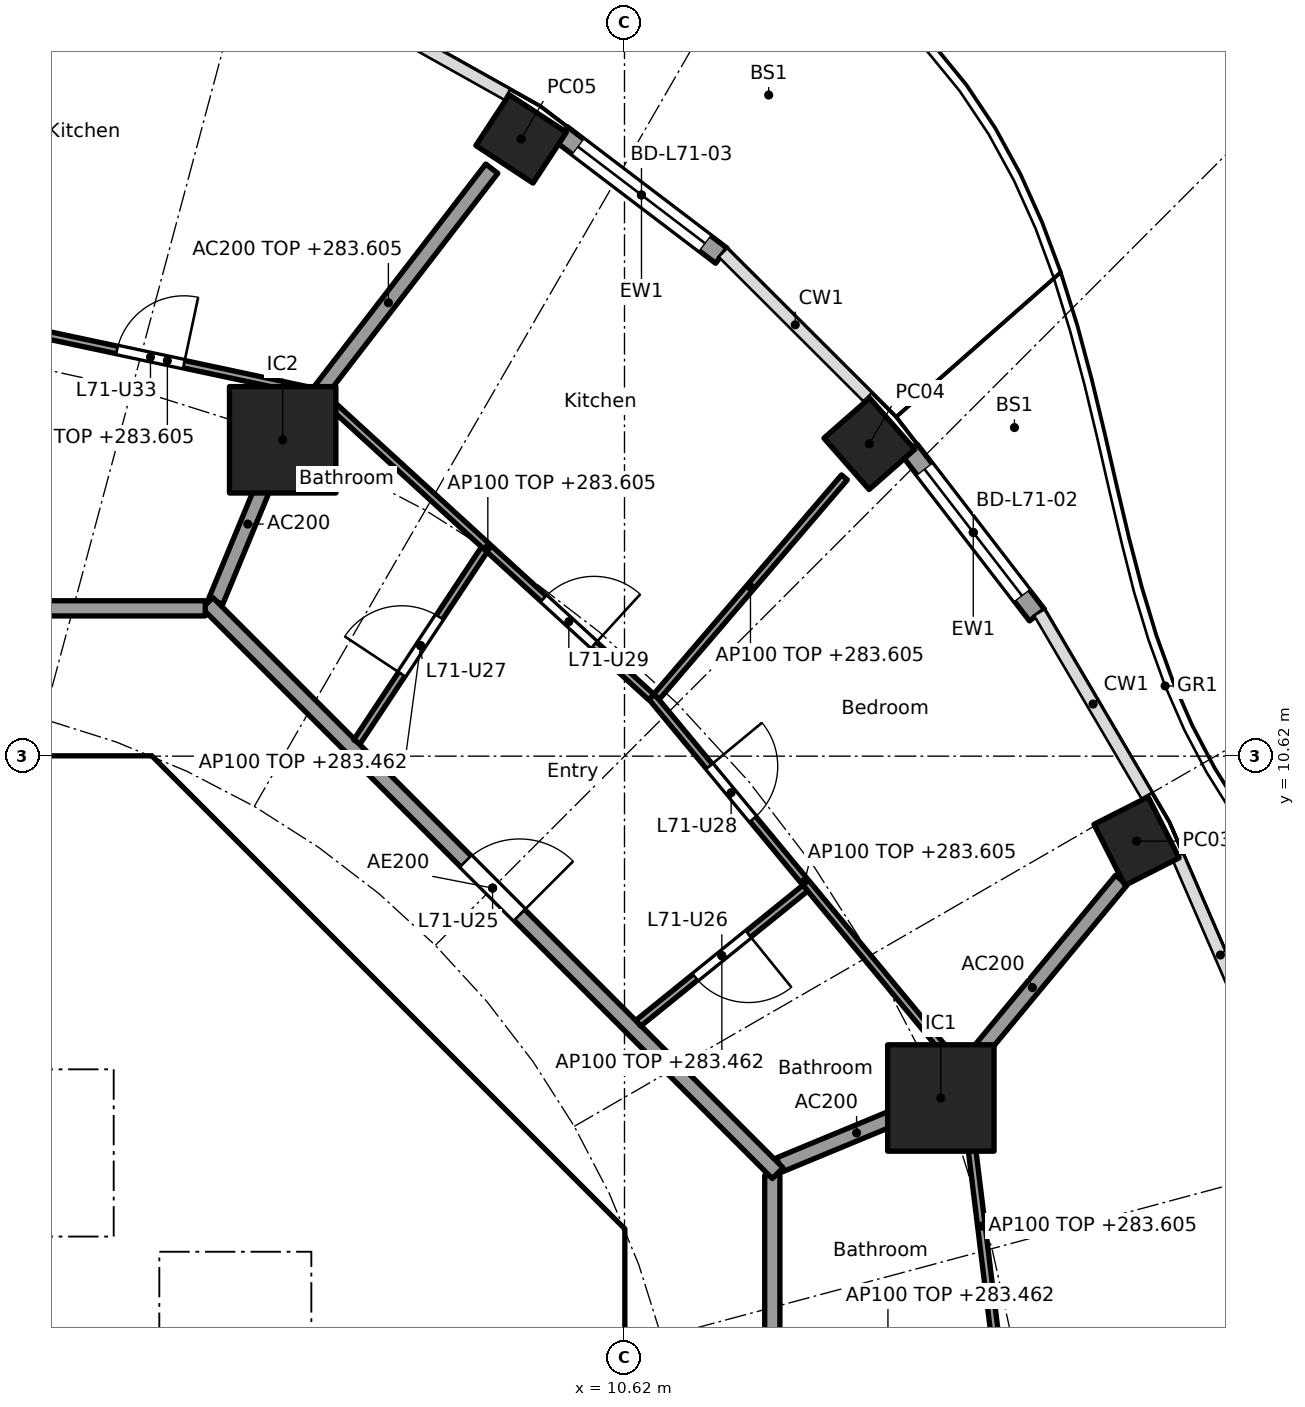
"""IFC4 building model, lengths in metres.
Left out: names, types, materials, properties, quantities, classifications, styles, units other than length and angle.
Written with IfcOpenShell. Run it as: python <this file> out.ifc"""

import sys

from ifc_helpers import new_model, si_unit, direction, frame, frame_2d, origin, origin_2d, place, context, subcontext, project, spatial, polyline, rectangle, hollow_rectangle, outline, extrude, element, fill, save


model = new_model("IFC4")
c1 = context("Model", 3, precision=1e-05, world=origin(), true_north=direction((0.0, 1.0)))
c2 = subcontext(c1, "Body", "Model", "MODEL_VIEW")
j1 = project(units=[si_unit("LENGTHUNIT", "METRE"), si_unit("PLANEANGLEUNIT", "RADIAN")], contexts=[c1])
p1 = place(None, origin())
s1 = spatial("IfcSite", under=j1, at=p1, CompositionType="ELEMENT")
p2 = place(p1, origin())
s2 = spatial("IfcBuilding", under=s1, at=p2, CompositionType="ELEMENT")
p3 = place(p2, frame((0.0, 0.0, 280.7)))
s3 = spatial("IfcBuildingStorey", under=s2, at=p3, CompositionType="ELEMENT", Elevation=280.7)
for number, where, z_axis, x_axis in (
    (1, (17.356, 9.502, 0.0), (0.0, 0.0, 1.0), (-0.452, 0.892, 0.0)),
    (2, (13.841, 14.73, 0.0), (0.0, 0.0, 1.0), (-0.66, 0.751, 0.0)),
    (3, (9.26, 18.741, 0.0), (0.0, 0.0, 1.0), (-0.836, 0.549, 0.0)),
):
    element("IfcColumn", number, at=place(p3, frame(where, z_axis=z_axis, x_axis=x_axis)), inside=s3, PredefinedType="COLUMN", context=c2, shape_type="SweptSolid", body=[
        extrude(hollow_rectangle(XDim=0.9, YDim=0.8, WallThickness=0.028, at=origin_2d()), origin(), (0.0, 0.0, 1.0), 3.7),
    ])
for number, where, z_axis, x_axis in (
    (4, (14.782, 6.123, 0.0), (0.0, 0.0, 1.0), (1.0, 0.0, 0.0)),
    (5, (6.123, 14.782, 0.0), (0.0, 0.0, 1.0), (1.0, 0.0, 0.0)),
):
    element("IfcColumn", number, at=place(p3, frame(where, z_axis=z_axis, x_axis=x_axis)), inside=s3, PredefinedType="COLUMN", context=c2, shape_type="SweptSolid", body=[
        extrude(rectangle(XDim=1.4, YDim=1.4, at=origin_2d()), origin(), (0.0, 0.0, 1.0), 3.7),
    ])
p4 = place(p3, frame((14.37, 14.65, 0.0), z_axis=(0.0, 0.0, 1.0), x_axis=(0.610475325435, -0.79203527512, 0.0)))
e6 = element("IfcWall", 6, at=p4, inside=s3, PredefinedType="SOLIDWALL", context=c2, shape_type="SweptSolid", body=[
    extrude(rectangle(XDim=2.746, YDim=0.25, at=frame_2d((1.373, 0.0))), origin(), (0.0, 0.0, 1.0), 3.44),
])
p5 = place(p4, frame((0.323, 0.0, 0.0)))
e7 = element("IfcOpeningElement", 7, at=p5, cuts=e6, PredefinedType="OPENING", context=c2, shape_type="SweptSolid", body=[
    extrude(rectangle(XDim=2.1, YDim=2.4, at=frame_2d((1.05, 1.2))), frame((0.0, 0.135, 0.0), z_axis=(0.0, -1.0, 0.0), x_axis=(1.0, 0.0, 0.0)), (0.0, 0.0, 1.0), 0.27),
])
p6 = place(p3, frame((9.792, 18.802, 0.0), z_axis=(0.0, 0.0, 1.0), x_axis=(0.796010739377, -0.605282498339, 0.0)))
e8 = element("IfcWall", 8, at=p6, inside=s3, PredefinedType="SOLIDWALL", context=c2, shape_type="SweptSolid", body=[
    extrude(rectangle(XDim=2.641, YDim=0.25, at=frame_2d((1.32, 0.0))), origin(), (0.0, 0.0, 1.0), 3.44),
])
p7 = place(p6, frame((0.27, 0.0, 0.0)))
e9 = element("IfcOpeningElement", 9, at=p7, cuts=e8, PredefinedType="OPENING", context=c2, shape_type="SweptSolid", body=[
    extrude(rectangle(XDim=2.1, YDim=2.4, at=frame_2d((1.05, 1.2))), frame((0.0, 0.135, 0.0), z_axis=(0.0, -1.0, 0.0), x_axis=(1.0, 0.0, 0.0)), (0.0, 0.0, 1.0), 0.27),
])
p8 = place(p3, frame((9.988, 4.613, 0.0), z_axis=(0.0, 0.0, 1.0), x_axis=(-0.707106781187, 0.707106781187, 0.0)))
e10 = element("IfcWall", 10, at=p8, inside=s3, PredefinedType="SHEAR", context=c2, shape_type="SweptSolid", body=[
    extrude(rectangle(XDim=7.602, YDim=0.6, at=frame_2d((3.801, 0.0))), origin(), (0.0, 0.0, 1.0), 3.44),
])
p9 = place(p8, frame((3.201, 0.0, 0.0)))
e11 = element("IfcOpeningElement", 11, at=p9, cuts=e10, PredefinedType="OPENING", context=c2, shape_type="SweptSolid", body=[
    extrude(rectangle(XDim=1.2, YDim=2.1, at=frame_2d((0.6, 1.05))), frame((0.0, 0.31, 0.0), z_axis=(0.0, -1.0, 0.0), x_axis=(1.0, 0.0, 0.0)), (0.0, 0.0, 1.0), 0.62),
])
p10 = place(p3, frame((4.0, 4.3, 0.0), z_axis=(0.0, 0.0, 1.0), x_axis=(0.0, 1.0, 0.0)))
e12 = element("IfcWall", 12, at=p10, inside=s3, PredefinedType="SOLIDWALL", context=c2, shape_type="SweptSolid", body=[
    extrude(rectangle(XDim=2.2, YDim=0.2, at=frame_2d((1.1, 0.0))), origin(), (0.0, 0.0, 1.0), 3.44),
])
p11 = place(p10, frame((0.55, 0.0, 0.0)))
e13 = element("IfcOpeningElement", 13, at=p11, cuts=e12, PredefinedType="OPENING", context=c2, shape_type="SweptSolid", body=[
    extrude(rectangle(XDim=1.1, YDim=2.1, at=frame_2d((0.55, 1.05))), frame((0.0, 0.11, 0.0), z_axis=(0.0, -1.0, 0.0), x_axis=(1.0, 0.0, 0.0)), (0.0, 0.0, 1.0), 0.22),
])
p12 = place(p3, frame((6.7, 4.0, 0.0), z_axis=(0.0, 0.0, 1.0), x_axis=(1.0, 0.0, 0.0)))
e14 = element("IfcWall", 14, at=p12, inside=s3, PredefinedType="SOLIDWALL", context=c2, shape_type="SweptSolid", body=[
    extrude(rectangle(XDim=3.325, YDim=0.2, at=frame_2d((1.662, 0.0))), origin(), (0.0, 0.0, 1.0), 3.44),
])
p13 = place(p12, frame((1.25, 0.0, 0.0)))
e15 = element("IfcOpeningElement", 15, at=p13, cuts=e14, PredefinedType="OPENING", context=c2, shape_type="SweptSolid", body=[
    extrude(rectangle(XDim=1.1, YDim=2.1, at=frame_2d((0.55, 1.05))), frame((0.0, 0.11, 0.0), z_axis=(0.0, -1.0, 0.0), x_axis=(1.0, 0.0, 0.0)), (0.0, 0.0, 1.0), 0.22),
])
p14 = place(p3, frame((4.0, 7.025, 0.0), z_axis=(0.0, 0.0, 1.0), x_axis=(0.0, 1.0, 0.0)))
e16 = element("IfcWall", 16, at=p14, inside=s3, PredefinedType="SOLIDWALL", context=c2, shape_type="SweptSolid", body=[
    extrude(rectangle(XDim=3.0, YDim=0.2, at=frame_2d((1.5, 0.0))), origin(), (0.0, 0.0, 1.0), 3.44),
])
p15 = place(p14, frame((0.925, 0.0, 0.0)))
e17 = element("IfcOpeningElement", 17, at=p15, cuts=e16, PredefinedType="OPENING", context=c2, shape_type="SweptSolid", body=[
    extrude(rectangle(XDim=1.1, YDim=2.1, at=frame_2d((0.55, 1.05))), frame((0.0, 0.11, 0.0), z_axis=(0.0, -1.0, 0.0), x_axis=(1.0, 0.0, 0.0)), (0.0, 0.0, 1.0), 0.22),
])
p16 = place(p3, origin())
e18 = element("IfcWall", 18, at=p16, inside=s3, PredefinedType="SHEAR", context=c2, shape_type="SweptSolid", body=[
    extrude(outline(polyline([(-4.152, 10.025), (-4.401, 9.776), (-4.825, 10.2), (-4.401, 10.625), (4.401, 10.625), (4.825, 10.2), (4.401, 9.776), (4.152, 10.025), (-4.152, 10.025)])), origin(), (0.0, 0.0, 1.0), 3.44),
])
p17 = place(p3, origin())
e19 = element("IfcWall", 19, at=p17, inside=s3, PredefinedType="SHEAR", context=c2, shape_type="SweptSolid", body=[
    extrude(outline(polyline([(9.776, -4.401), (10.025, -4.152), (10.025, -3.801), (10.025, 4.152), (9.776, 4.401), (10.2, 4.825), (10.625, 4.401), (10.625, -4.401), (10.2, -4.825), (9.776, -4.401)])), origin(), (0.0, 0.0, 1.0), 3.44),
])
p18 = place(p3, origin())
e20 = element("IfcWall", 20, at=p18, inside=s3, PredefinedType="SOLIDWALL", context=c2, shape_type="SweptSolid", body=[
    extrude(outline(polyline([(-6.7, 4.3), (6.7, 4.3), (6.7, 2.1), (6.5, 2.1), (6.5, 4.1), (4.5, 4.1), (4.5, 2.1), (4.3, 2.1), (4.3, 4.1), (0.1, 4.1), (0.1, 2.1), (-0.1, 2.1), (-0.1, 4.1), (-2.1, 4.1), (-2.1, 2.1), (-2.3, 2.1), (-2.3, 4.1), (-6.5, 4.1), (-6.5, 2.1), (-6.7, 2.1), (-6.7, 4.3)])), origin(), (0.0, 0.0, 1.0), 3.44),
])
p19 = place(p3, origin())
e21 = element("IfcWall", 21, at=p19, inside=s3, PredefinedType="SOLIDWALL", context=c2, shape_type="SweptSolid", body=[
    extrude(outline(polyline([(4.1, 6.5), (-4.1, 6.5), (-4.1, 7.025), (4.1, 7.025), (4.1, 6.5)])), origin(), (0.0, 0.0, 1.0), 3.44),
])
p20 = place(p3, origin())
e22 = element("IfcWall", 22, at=p20, inside=s3, PredefinedType="SOLIDWALL", context=c2, shape_type="SweptSolid", body=[
    extrude(outline(polyline([(7.025, -3.9), (6.7, -3.9), (6.7, 3.9), (7.025, 3.9), (7.025, -3.9)])), origin(), (0.0, 0.0, 1.0), 3.44),
])
p21 = place(p3, frame((12.657, 5.243, 0.0), z_axis=(0.0, 0.0, 1.0), x_axis=(0.923853160736, 0.382747093259, 0.0)))
e23 = element("IfcWall", 23, at=p21, inside=s3, PredefinedType="PARTITIONING", context=c2, shape_type="SweptSolid", body=[
    extrude(rectangle(XDim=2.2, YDim=0.2, at=frame_2d((1.1, 0.0))), origin(), (0.0, 0.0, 1.0), 3.44),
])
p22 = place(p3, frame((14.814, 6.161, 0.0), z_axis=(0.0, 0.0, 1.0), x_axis=(0.638050520313, 0.769994502272, 0.0)))
e24 = element("IfcWall", 24, at=p22, inside=s3, PredefinedType="PARTITIONING", context=c2, shape_type="SweptSolid", body=[
    extrude(rectangle(XDim=3.673, YDim=0.2, at=frame_2d((1.836, 0.0))), origin(), (0.0, 0.0, 1.0), 3.44),
])
p23 = place(p3, frame((5.243, 12.657, 0.0), z_axis=(0.0, 0.0, 1.0), x_axis=(0.382691608661, 0.923876145736, 0.0)))
e25 = element("IfcWall", 25, at=p23, inside=s3, PredefinedType="PARTITIONING", context=c2, shape_type="SweptSolid", body=[
    extrude(rectangle(XDim=2.2, YDim=0.2, at=frame_2d((1.1, 0.0))), origin(), (0.0, 0.0, 1.0), 3.44),
])
p24 = place(p3, frame((6.154, 14.822, 0.0), z_axis=(0.0, 0.0, 1.0), x_axis=(0.610687612043, 0.791871606068, 0.0)))
e26 = element("IfcWall", 26, at=p24, inside=s3, PredefinedType="PARTITIONING", context=c2, shape_type="SweptSolid", body=[
    extrude(rectangle(XDim=4.455, YDim=0.2, at=frame_2d((2.228, 0.0))), origin(), (0.0, 0.0, 1.0), 2.905),
])
p25 = place(p3, frame((12.565, -5.104, 0.0), z_axis=(0.0, 0.0, 1.0), x_axis=(0.0, 1.0, 0.0)))
e27 = element("IfcWall", 27, at=p25, inside=s3, PredefinedType="PARTITIONING", context=c2, shape_type="SweptSolid", body=[
    extrude(rectangle(XDim=10.209, YDim=0.2, at=frame_2d((5.104, 0.0))), origin(), (0.0, 0.0, 1.0), 3.44),
])
p26 = place(p25, frame((4.604, 0.0, 0.0)))
e28 = element("IfcOpeningElement", 28, at=p26, cuts=e27, PredefinedType="OPENING", context=c2, shape_type="SweptSolid", body=[
    extrude(rectangle(XDim=1.0, YDim=2.1, at=frame_2d((0.5, 1.05))), frame((0.0, 0.11, 0.0), z_axis=(0.0, -1.0, 0.0), x_axis=(1.0, 0.0, 0.0)), (0.0, 0.0, 1.0), 0.22),
])
p27 = place(p3, frame((12.635, 5.134, 0.0), z_axis=(0.0, 0.0, 1.0), x_axis=(-0.707106781187, 0.707106781187, 0.0)))
e29 = element("IfcWall", 29, at=p27, inside=s3, PredefinedType="PARTITIONING", context=c2, shape_type="SweptSolid", body=[
    extrude(rectangle(XDim=10.609, YDim=0.2, at=frame_2d((5.305, 0.0))), origin(), (0.0, 0.0, 1.0), 3.44),
])
p28 = place(p27, frame((4.804, 0.0, 0.0)))
e30 = element("IfcOpeningElement", 30, at=p28, cuts=e29, PredefinedType="OPENING", context=c2, shape_type="SweptSolid", body=[
    extrude(rectangle(XDim=1.0, YDim=2.1, at=frame_2d((0.5, 1.05))), frame((0.0, 0.11, 0.0), z_axis=(0.0, -1.0, 0.0), x_axis=(1.0, 0.0, 0.0)), (0.0, 0.0, 1.0), 0.22),
])
p29 = place(p3, frame((5.104, 12.565, 0.0), z_axis=(0.0, 0.0, 1.0), x_axis=(-1.0, 0.0, 0.0)))
e31 = element("IfcWall", 31, at=p29, inside=s3, PredefinedType="PARTITIONING", context=c2, shape_type="SweptSolid", body=[
    extrude(rectangle(XDim=10.409, YDim=0.2, at=frame_2d((5.205, 0.0))), origin(), (0.0, 0.0, 1.0), 3.44),
])
p30 = place(p29, frame((6.339, 0.0, 0.0)))
e32 = element("IfcOpeningElement", 32, at=p30, cuts=e31, PredefinedType="OPENING", context=c2, shape_type="SweptSolid", body=[
    extrude(rectangle(XDim=1.0, YDim=2.1, at=frame_2d((0.5, 1.05))), frame((0.0, 0.11, 0.0), z_axis=(0.0, -1.0, 0.0), x_axis=(1.0, 0.0, 0.0)), (0.0, 0.0, 1.0), 0.22),
])
p31 = place(p3, frame((15.552, 2.508, 0.0), z_axis=(0.0, 0.0, 1.0), x_axis=(-0.12196293976, 0.992534654974, 0.0)))
e33 = element("IfcWall", 33, at=p31, inside=s3, PredefinedType="PARTITIONING", context=c2, shape_type="SweptSolid", body=[
    extrude(rectangle(XDim=3.887, YDim=0.1, at=frame_2d((1.944, 0.0))), origin(), (0.0, 0.0, 1.0), 2.905),
])
p32 = place(p3, frame((15.002, 6.543, 0.0), z_axis=(0.0, 0.0, 1.0), x_axis=(-0.637932656528, 0.770092154054, 0.0)))
e34 = element("IfcWall", 34, at=p32, inside=s3, PredefinedType="PARTITIONING", context=c2, shape_type="SweptSolid", body=[
    extrude(rectangle(XDim=6.311, YDim=0.1, at=frame_2d((3.155, 0.0))), origin(), (0.0, 0.0, 1.0), 2.905),
])
p33 = place(p32, frame((4.22, 0.0, 0.0)))
e35 = element("IfcOpeningElement", 35, at=p33, cuts=e34, PredefinedType="OPENING", context=c2, shape_type="SweptSolid", body=[
    extrude(rectangle(XDim=0.9, YDim=2.1, at=frame_2d((0.45, 1.05))), frame((0.0, 0.06, 0.0), z_axis=(0.0, -1.0, 0.0), x_axis=(1.0, 0.0, 0.0)), (0.0, 0.0, 1.0), 0.12),
])
p34 = place(p3, frame((10.802, 7.107, 0.0), z_axis=(0.0, 0.0, 1.0), x_axis=(0.777526610395, 0.628850037868, 0.0)))
e36 = element("IfcWall", 36, at=p34, inside=s3, PredefinedType="PARTITIONING", context=c2, shape_type="SweptSolid", body=[
    extrude(rectangle(XDim=2.824, YDim=0.1, at=frame_2d((1.412, 0.0))), origin(), (0.0, 0.0, 1.0), 2.762),
])
p35 = place(p34, frame((0.962, 0.0, 0.0)))
e37 = element("IfcOpeningElement", 37, at=p35, cuts=e36, PredefinedType="OPENING", context=c2, shape_type="SweptSolid", body=[
    extrude(rectangle(XDim=0.9, YDim=2.1, at=frame_2d((0.45, 1.05))), frame((0.0, 0.06, 0.0), z_axis=(0.0, -1.0, 0.0), x_axis=(1.0, 0.0, 0.0)), (0.0, 0.0, 1.0), 0.12),
])
p36 = place(p3, frame((11.041, 11.402, 0.0), z_axis=(0.0, 0.0, 1.0), x_axis=(0.650558544325, 0.759456108282, 0.0)))
e38 = element("IfcWall", 38, at=p36, inside=s3, PredefinedType="PARTITIONING", context=c2, shape_type="SweptSolid", body=[
    extrude(rectangle(XDim=3.8, YDim=0.1, at=frame_2d((1.9, 0.0))), origin(), (0.0, 0.0, 1.0), 2.905),
])
p37 = place(p3, frame((10.972, 11.398, 0.0), z_axis=(0.0, 0.0, 1.0), x_axis=(-0.737830272434, 0.674986288069, 0.0)))
e39 = element("IfcWall", 39, at=p37, inside=s3, PredefinedType="PARTITIONING", context=c2, shape_type="SweptSolid", body=[
    extrude(rectangle(XDim=5.827, YDim=0.1, at=frame_2d((2.914, 0.0))), origin(), (0.0, 0.0, 1.0), 2.905),
])
p38 = place(p37, frame((1.019, 0.0, 0.0)))
e40 = element("IfcOpeningElement", 40, at=p38, cuts=e39, PredefinedType="OPENING", context=c2, shape_type="SweptSolid", body=[
    extrude(rectangle(XDim=0.9, YDim=2.1, at=frame_2d((0.45, 1.05))), frame((0.0, 0.06, 0.0), z_axis=(0.0, -1.0, 0.0), x_axis=(1.0, 0.0, 0.0)), (0.0, 0.0, 1.0), 0.12),
])
p39 = place(p3, frame((7.1, 10.808, 0.0), z_axis=(0.0, 0.0, 1.0), x_axis=(0.55204370542, 0.833815175747, 0.0)))
e41 = element("IfcWall", 41, at=p39, inside=s3, PredefinedType="PARTITIONING", context=c2, shape_type="SweptSolid", body=[
    extrude(rectangle(XDim=3.036, YDim=0.1, at=frame_2d((1.518, 0.0))), origin(), (0.0, 0.0, 1.0), 2.762),
])
p40 = place(p39, frame((1.068, 0.0, 0.0)))
e42 = element("IfcOpeningElement", 42, at=p40, cuts=e41, PredefinedType="OPENING", context=c2, shape_type="SweptSolid", body=[
    extrude(rectangle(XDim=0.9, YDim=2.1, at=frame_2d((0.45, 1.05))), frame((0.0, 0.06, 0.0), z_axis=(0.0, -1.0, 0.0), x_axis=(1.0, 0.0, 0.0)), (0.0, 0.0, 1.0), 0.12),
])
p41 = place(p3, frame((6.5, 15.419, 0.0), z_axis=(0.0, 0.0, 1.0), x_axis=(-0.978053492557, 0.208353943321, 0.0)))
e43 = element("IfcWall", 43, at=p41, inside=s3, PredefinedType="PARTITIONING", context=c2, shape_type="SweptSolid", body=[
    extrude(rectangle(XDim=3.874, YDim=0.1, at=frame_2d((1.937, 0.0))), origin(), (0.0, 0.0, 1.0), 2.905),
])
p42 = place(p41, frame((1.714, 0.0, 0.0)))
e44 = element("IfcOpeningElement", 44, at=p42, cuts=e43, PredefinedType="OPENING", context=c2, shape_type="SweptSolid", body=[
    extrude(rectangle(XDim=0.9, YDim=2.1, at=frame_2d((0.45, 1.05))), frame((0.0, 0.06, 0.0), z_axis=(0.0, -1.0, 0.0), x_axis=(1.0, 0.0, 0.0)), (0.0, 0.0, 1.0), 0.12),
])
p43 = place(p5, origin())
e45 = element("IfcDoor", 45, at=p43, inside=s3, OperationType="SLIDING_TO_LEFT", PredefinedType="DOOR", context=c2, shape_type="SweptSolid", body=[
    extrude(rectangle(XDim=2.1, YDim=2.4, at=frame_2d((1.05, 1.2))), frame((0.0, 0.025, 0.0), z_axis=(0.0, -1.0, 0.0), x_axis=(1.0, 0.0, 0.0)), (0.0, 0.0, 1.0), 0.05),
])
fill(e7, e45)
p44 = place(p7, origin())
e46 = element("IfcDoor", 46, at=p44, inside=s3, OperationType="SLIDING_TO_LEFT", PredefinedType="DOOR", context=c2, shape_type="SweptSolid", body=[
    extrude(rectangle(XDim=2.1, YDim=2.4, at=frame_2d((1.05, 1.2))), frame((0.0, 0.025, 0.0), z_axis=(0.0, -1.0, 0.0), x_axis=(1.0, 0.0, 0.0)), (0.0, 0.0, 1.0), 0.05),
])
fill(e9, e46)
p45 = place(p11, origin())
e47 = element("IfcDoor", 47, at=p45, inside=s3, OperationType="DOUBLE_DOOR_SLIDING", PredefinedType="DOOR", context=c2, shape_type="SweptSolid", body=[
    extrude(rectangle(XDim=1.1, YDim=2.1, at=frame_2d((0.55, 1.05))), frame((0.0, 0.025, 0.0), z_axis=(0.0, -1.0, 0.0), x_axis=(1.0, 0.0, 0.0)), (0.0, 0.0, 1.0), 0.05),
])
fill(e13, e47)
p46 = place(p13, frame((1.1, 0.0, 0.0), x_axis=(-1.0, 0.0, 0.0)))
e48 = element("IfcDoor", 48, at=p46, inside=s3, OperationType="SINGLE_SWING_LEFT", PredefinedType="DOOR", context=c2, shape_type="SweptSolid", body=[
    extrude(rectangle(XDim=1.1, YDim=2.1, at=frame_2d((0.55, 1.05))), frame((0.0, 0.025, 0.0), z_axis=(0.0, -1.0, 0.0), x_axis=(1.0, 0.0, 0.0)), (0.0, 0.0, 1.0), 0.05),
])
fill(e15, e48)
p47 = place(p15, origin())
e49 = element("IfcDoor", 49, at=p47, inside=s3, OperationType="SINGLE_SWING_RIGHT", PredefinedType="DOOR", context=c2, shape_type="SweptSolid", body=[
    extrude(rectangle(XDim=1.1, YDim=2.1, at=frame_2d((0.55, 1.05))), frame((0.0, 0.025, 0.0), z_axis=(0.0, -1.0, 0.0), x_axis=(1.0, 0.0, 0.0)), (0.0, 0.0, 1.0), 0.05),
])
fill(e17, e49)
p48 = place(p9, origin())
e50 = element("IfcDoor", 50, at=p48, inside=s3, OperationType="SINGLE_SWING_RIGHT", PredefinedType="DOOR", context=c2, shape_type="SweptSolid", body=[
    extrude(rectangle(XDim=1.2, YDim=2.1, at=frame_2d((0.6, 1.05))), frame((0.0, 0.025, 0.0), z_axis=(0.0, -1.0, 0.0), x_axis=(1.0, 0.0, 0.0)), (0.0, 0.0, 1.0), 0.05),
])
fill(e11, e50)
p49 = place(p28, frame((1.0, 0.0, 0.0), x_axis=(-1.0, 0.0, 0.0)))
e51 = element("IfcDoor", 51, at=p49, inside=s3, OperationType="SINGLE_SWING_RIGHT", PredefinedType="DOOR", context=c2, shape_type="SweptSolid", body=[
    extrude(rectangle(XDim=1.0, YDim=2.1, at=frame_2d((0.5, 1.05))), frame((0.0, 0.025, 0.0), z_axis=(0.0, -1.0, 0.0), x_axis=(1.0, 0.0, 0.0)), (0.0, 0.0, 1.0), 0.05),
])
fill(e30, e51)
p50 = place(p35, frame((0.9, 0.0, 0.0), x_axis=(-1.0, 0.0, 0.0)))
e52 = element("IfcDoor", 52, at=p50, inside=s3, OperationType="SINGLE_SWING_LEFT", PredefinedType="DOOR", context=c2, shape_type="SweptSolid", body=[
    extrude(rectangle(XDim=0.9, YDim=2.1, at=frame_2d((0.45, 1.05))), frame((0.0, 0.025, 0.0), z_axis=(0.0, -1.0, 0.0), x_axis=(1.0, 0.0, 0.0)), (0.0, 0.0, 1.0), 0.05),
])
fill(e37, e52)
p51 = place(p40, origin())
e53 = element("IfcDoor", 53, at=p51, inside=s3, OperationType="SINGLE_SWING_LEFT", PredefinedType="DOOR", context=c2, shape_type="SweptSolid", body=[
    extrude(rectangle(XDim=0.9, YDim=2.1, at=frame_2d((0.45, 1.05))), frame((0.0, 0.025, 0.0), z_axis=(0.0, -1.0, 0.0), x_axis=(1.0, 0.0, 0.0)), (0.0, 0.0, 1.0), 0.05),
])
fill(e42, e53)
p52 = place(p33, frame((0.9, 0.0, 0.0), x_axis=(-1.0, 0.0, 0.0)))
e54 = element("IfcDoor", 54, at=p52, inside=s3, OperationType="SINGLE_SWING_LEFT", PredefinedType="DOOR", context=c2, shape_type="SweptSolid", body=[
    extrude(rectangle(XDim=0.9, YDim=2.1, at=frame_2d((0.45, 1.05))), frame((0.0, 0.025, 0.0), z_axis=(0.0, -1.0, 0.0), x_axis=(1.0, 0.0, 0.0)), (0.0, 0.0, 1.0), 0.05),
])
fill(e35, e54)
p53 = place(p38, frame((0.9, 0.0, 0.0), x_axis=(-1.0, 0.0, 0.0)))
e55 = element("IfcDoor", 55, at=p53, inside=s3, OperationType="SINGLE_SWING_RIGHT", PredefinedType="DOOR", context=c2, shape_type="SweptSolid", body=[
    extrude(rectangle(XDim=0.9, YDim=2.1, at=frame_2d((0.45, 1.05))), frame((0.0, 0.025, 0.0), z_axis=(0.0, -1.0, 0.0), x_axis=(1.0, 0.0, 0.0)), (0.0, 0.0, 1.0), 0.05),
])
fill(e40, e55)
p54 = place(p42, frame((0.9, 0.0, 0.0), x_axis=(-1.0, 0.0, 0.0)))
e56 = element("IfcDoor", 56, at=p54, inside=s3, OperationType="SINGLE_SWING_RIGHT", PredefinedType="DOOR", context=c2, shape_type="SweptSolid", body=[
    extrude(rectangle(XDim=0.9, YDim=2.1, at=frame_2d((0.45, 1.05))), frame((0.0, 0.025, 0.0), z_axis=(0.0, -1.0, 0.0), x_axis=(1.0, 0.0, 0.0)), (0.0, 0.0, 1.0), 0.05),
])
fill(e44, e56)
save(model, sys.argv[1])
